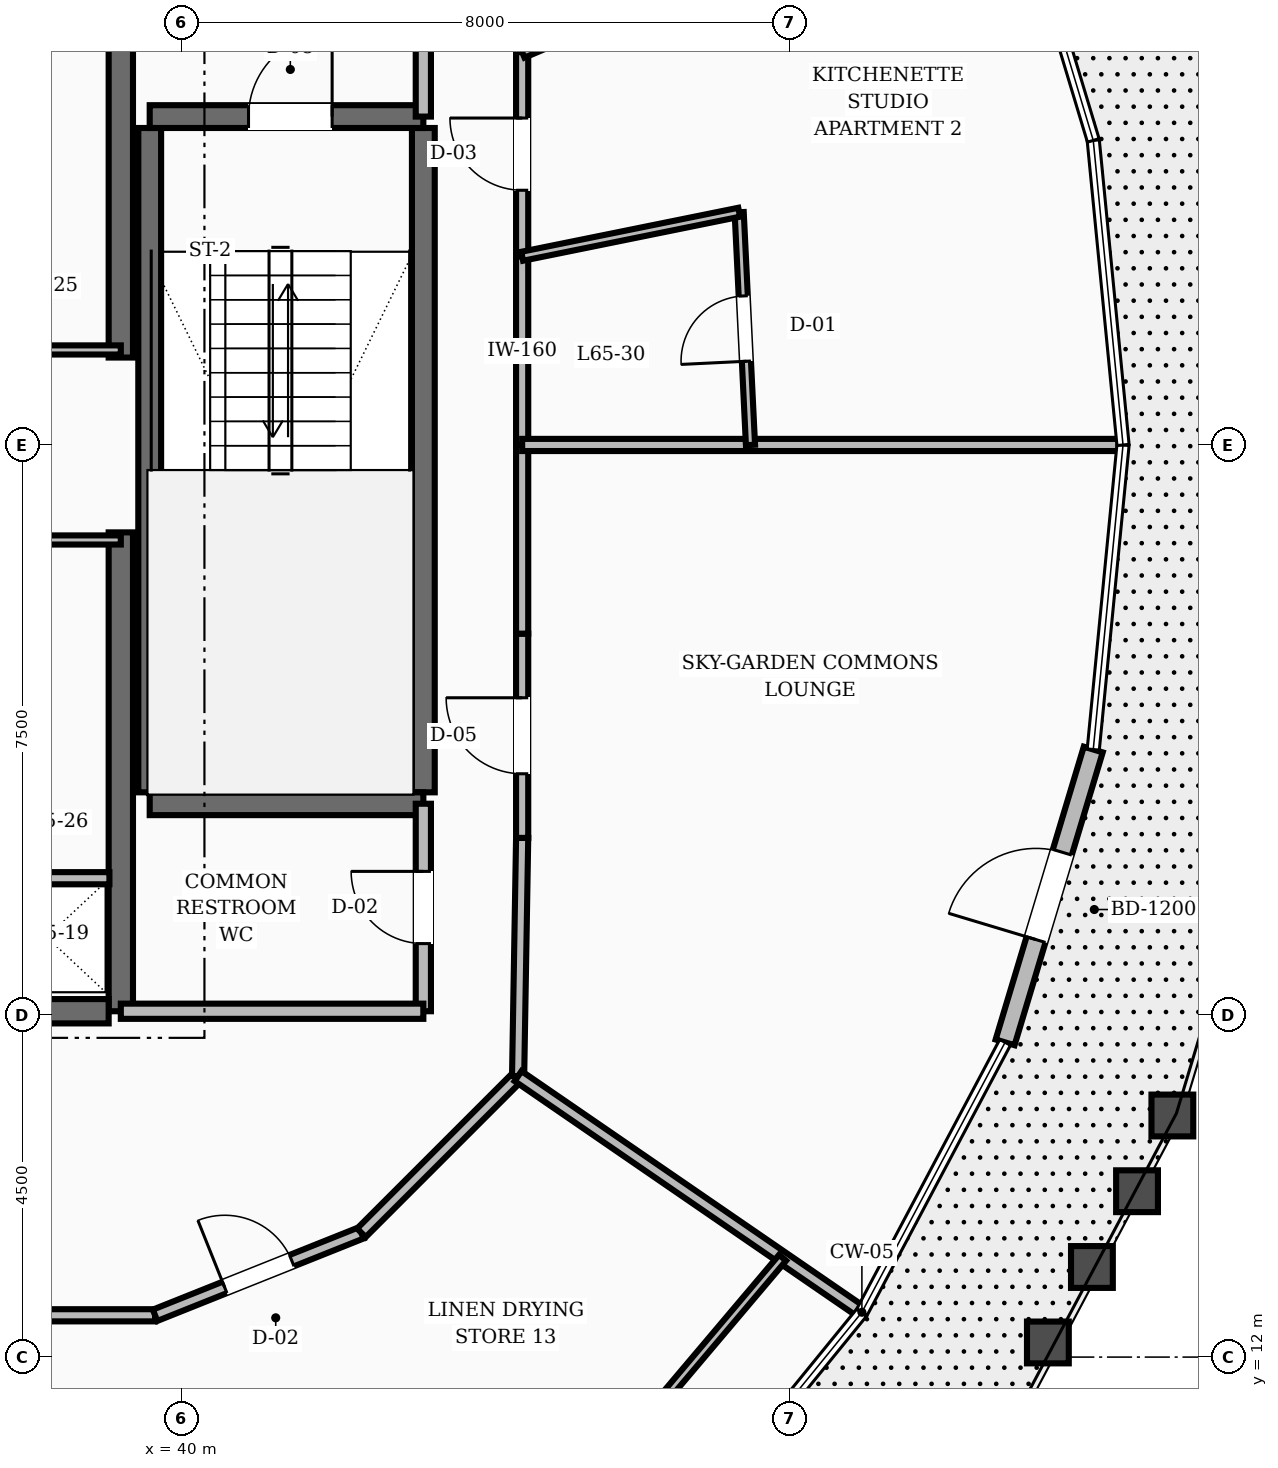
"""IFC4 building model, lengths in metres.
Left out: names, types, materials, properties, quantities, classifications, styles, units other than length and angle.
Written with IfcOpenShell. Run it as: python <this file> out.ifc"""

import sys

from ifc_helpers import new_model, si_unit, direction, frame, frame_2d, origin, place, context, subcontext, project, spatial, rectangle, extrude, element, fill, save


model = new_model("IFC4")
c1 = context("Model", 3, precision=1e-05, world=origin(), true_north=direction((0.0, 1.0)))
c2 = subcontext(c1, "Body", "Model", "MODEL_VIEW")
j1 = project(units=[si_unit("LENGTHUNIT", "METRE"), si_unit("PLANEANGLEUNIT", "RADIAN")], contexts=[c1])
p1 = place(None, origin())
s1 = spatial("IfcSite", under=j1, at=p1, CompositionType="ELEMENT")
p2 = place(p1, origin())
s2 = spatial("IfcBuilding", under=s1, at=p2, CompositionType="ELEMENT")
p3 = place(p2, frame((0.0, 0.0, 250.8)))
s3 = spatial("IfcBuildingStorey", under=s2, at=p3, CompositionType="ELEMENT", Elevation=250.8)
for number, where, z_axis, x_axis in (
    (1, (39.2, 16.55, 0.0), (0.0, 0.0, 1.0), (0.0, 1.0, 0.0)),
    (2, (39.2, 25.15, 0.0), (0.0, 0.0, 1.0), (0.0, 1.0, 0.0)),
):
    element("IfcWall", number, at=place(p3, frame(where, z_axis=z_axis, x_axis=x_axis)), inside=s3, PredefinedType="SHEAR", context=c2, shape_type="SweptSolid", body=[
        extrude(rectangle(XDim=6.3, YDim=0.32, at=frame_2d((3.15, 0.0))), origin(), (0.0, 0.0, 1.0), 3.6),
    ])
p4 = place(p3, frame((35.8, 16.55, 0.0), z_axis=(0.0, 0.0, 1.0), x_axis=(1.0, 0.0, 0.0)))
e3 = element("IfcWall", 3, at=p4, inside=s3, PredefinedType="SHEAR", context=c2, shape_type="SweptSolid", body=[
    extrude(rectangle(XDim=3.24, YDim=0.32, at=frame_2d((1.62, 0.0))), origin(), (0.0, 0.0, 1.0), 3.6),
])
p5 = place(p4, frame((0.3, 0.0, 0.0)))
e4 = element("IfcOpeningElement", 4, at=p5, cuts=e3, PredefinedType="OPENING", context=c2, shape_type="SweptSolid", body=[
    extrude(rectangle(XDim=1.1, YDim=2.1, at=frame_2d((0.55, 1.05))), frame((0.0, 0.17, 0.0), z_axis=(0.0, -1.0, 0.0), x_axis=(1.0, 0.0, 0.0)), (0.0, 0.0, 1.0), 0.34),
])
for number, where, z_axis, x_axis in (
    (5, (43.18, 19.43, 0.0), (0.0, 0.0, 1.0), (0.0, 1.0, 0.0)),
    (6, (39.58, 19.43, 0.0), (0.0, 0.0, 1.0), (0.0, 1.0, 0.0)),
):
    element("IfcWall", number, at=place(p3, frame(where, z_axis=z_axis, x_axis=x_axis)), inside=s3, PredefinedType="SHEAR", context=c2, shape_type="SweptSolid", body=[
        extrude(rectangle(XDim=8.74, YDim=0.3, at=frame_2d((4.37, 0.0))), origin(), (0.0, 0.0, 1.0), 3.6),
    ])
p6 = place(p3, frame((39.58, 19.28, 0.0), z_axis=(0.0, 0.0, 1.0), x_axis=(1.0, 0.0, 0.0)))
e7 = element("IfcWall", 7, at=p6, inside=s3, PredefinedType="SHEAR", context=c2, shape_type="SweptSolid", body=[
    extrude(rectangle(XDim=3.6, YDim=0.3, at=frame_2d((1.8, 0.0))), origin(), (0.0, 0.0, 1.0), 3.6),
])
p7 = place(p3, frame((39.58, 28.32, 0.0), z_axis=(0.0, 0.0, 1.0), x_axis=(1.0, 0.0, 0.0)))
e8 = element("IfcWall", 8, at=p7, inside=s3, PredefinedType="SHEAR", context=c2, shape_type="SweptSolid", body=[
    extrude(rectangle(XDim=3.6, YDim=0.3, at=frame_2d((1.8, 0.0))), origin(), (0.0, 0.0, 1.0), 3.6),
])
p8 = place(p7, frame((1.3, 0.0, 0.0)))
e9 = element("IfcOpeningElement", 9, at=p8, cuts=e8, PredefinedType="OPENING", context=c2, shape_type="SweptSolid", body=[
    extrude(rectangle(XDim=1.1, YDim=2.1, at=frame_2d((0.55, 1.05))), frame((0.0, 0.16, 0.0), z_axis=(0.0, -1.0, 0.0), x_axis=(1.0, 0.0, 0.0)), (0.0, 0.0, 1.0), 0.32),
])
p9 = place(p3, frame((50.833, 16.141, 0.0), z_axis=(0.0, 0.0, 1.0), x_axis=(0.288277391775, 0.957546941612, 0.0)))
e10 = element("IfcWall", 10, at=p9, inside=s3, PredefinedType="STANDARD", context=c2, shape_type="SweptSolid", body=[
    extrude(rectangle(XDim=4.024, YDim=0.26, at=frame_2d((2.012, 0.0))), origin(), (0.0, 0.0, 1.0), 2.88),
])
p10 = place(p9, frame((1.412, 0.0, 0.0)))
e11 = element("IfcOpeningElement", 11, at=p10, cuts=e10, PredefinedType="OPENING", context=c2, shape_type="SweptSolid", body=[
    extrude(rectangle(XDim=1.2, YDim=2.15, at=frame_2d((0.6, 1.075))), frame((0.0, 0.14, 0.0), z_axis=(0.0, -1.0, 0.0), x_axis=(1.0, 0.0, 0.0)), (0.0, 0.0, 1.0), 0.28),
])
p11 = place(p3, frame((43.18, 28.32, 0.0), z_axis=(0.0, 0.0, 1.0), x_axis=(0.0, 1.0, 0.0)))
e12 = element("IfcWall", 12, at=p11, inside=s3, PredefinedType="SOLIDWALL", context=c2, shape_type="SweptSolid", body=[
    extrude(rectangle(XDim=3.13, YDim=0.2, at=frame_2d((1.565, 0.0))), origin(), (0.0, 0.0, 1.0), 2.87),
])
p12 = place(p11, frame((1.015, 0.0, 0.0)))
e13 = element("IfcOpeningElement", 13, at=p12, cuts=e12, PredefinedType="OPENING", context=c2, shape_type="SweptSolid", body=[
    extrude(rectangle(XDim=1.1, YDim=2.1, at=frame_2d((0.55, 1.05))), frame((0.0, 0.11, 0.0), z_axis=(0.0, -1.0, 0.0), x_axis=(1.0, 0.0, 0.0)), (0.0, 0.0, 1.0), 0.22),
])
p13 = place(p3, frame((43.18, 16.55, 0.0), z_axis=(0.0, 0.0, 1.0), x_axis=(0.0, 1.0, 0.0)))
e14 = element("IfcWall", 14, at=p13, inside=s3, PredefinedType="SOLIDWALL", context=c2, shape_type="SweptSolid", body=[
    extrude(rectangle(XDim=2.73, YDim=0.2, at=frame_2d((1.365, 0.0))), origin(), (0.0, 0.0, 1.0), 2.87),
])
p14 = place(p13, frame((0.89, 0.0, 0.0)))
e15 = element("IfcOpeningElement", 15, at=p14, cuts=e14, PredefinedType="OPENING", context=c2, shape_type="SweptSolid", body=[
    extrude(rectangle(XDim=0.95, YDim=2.1, at=frame_2d((0.475, 1.05))), frame((0.0, 0.11, 0.0), z_axis=(0.0, -1.0, 0.0), x_axis=(1.0, 0.0, 0.0)), (0.0, 0.0, 1.0), 0.22),
])
p15 = place(p3, frame((39.2, 16.55, 0.0), z_axis=(0.0, 0.0, 1.0), x_axis=(1.0, 0.0, 0.0)))
e16 = element("IfcWall", 16, at=p15, inside=s3, PredefinedType="SOLIDWALL", context=c2, shape_type="SweptSolid", body=[
    extrude(rectangle(XDim=3.98, YDim=0.2, at=frame_2d((1.99, 0.0))), origin(), (0.0, 0.0, 1.0), 2.87),
])
p16 = place(p3, frame((37.4, 18.3, 0.0), z_axis=(0.0, 0.0, 1.0), x_axis=(1.0, 0.0, 0.0)))
e17 = element("IfcWall", 17, at=p16, inside=s3, PredefinedType="SOLIDWALL", context=c2, shape_type="SweptSolid", body=[
    extrude(rectangle(XDim=1.65, YDim=0.16, at=frame_2d((0.825, 0.0))), origin(), (0.0, 0.0, 1.0), 2.87),
])
for number, where, z_axis, x_axis in (
    (18, (37.4, 25.25, 0.0), (0.0, 0.0, 1.0), (1.0, 0.0, 0.0)),
    (19, (37.4, 22.75, 0.0), (0.0, 0.0, 1.0), (1.0, 0.0, 0.0)),
):
    element("IfcWall", number, at=place(p3, frame(where, z_axis=z_axis, x_axis=x_axis)), inside=s3, PredefinedType="PARTITIONING", context=c2, shape_type="SweptSolid", body=[
        extrude(rectangle(XDim=1.8, YDim=0.12, at=frame_2d((0.9, 0.0))), origin(), (0.0, 0.0, 1.0), 2.87),
    ])
p17 = place(p3, frame((44.48, 24.0, 0.0), z_axis=(0.0, 0.0, 1.0), x_axis=(0.0, 1.0, 0.0)))
e20 = element("IfcWall", 20, at=p17, inside=s3, PredefinedType="SOLIDWALL", context=c2, shape_type="SweptSolid", body=[
    extrude(rectangle(XDim=2.482, YDim=0.16, at=frame_2d((1.241, 0.0))), origin(), (0.0, 0.0, 1.0), 2.87),
])
p18 = place(p3, frame((44.48, 26.482, 0.0), z_axis=(0.0, 0.0, 1.0), x_axis=(0.0, 1.0, 0.0)))
e21 = element("IfcWall", 21, at=p18, inside=s3, PredefinedType="SOLIDWALL", context=c2, shape_type="SweptSolid", body=[
    extrude(rectangle(XDim=2.687, YDim=0.16, at=frame_2d((1.344, 0.0))), origin(), (0.0, 0.0, 1.0), 2.87),
])
p19 = place(p18, frame((0.868, 0.0, 0.0)))
e22 = element("IfcOpeningElement", 22, at=p19, cuts=e21, PredefinedType="OPENING", context=c2, shape_type="SweptSolid", body=[
    extrude(rectangle(XDim=0.95, YDim=2.1, at=frame_2d((0.475, 1.05))), frame((0.0, 0.09, 0.0), z_axis=(0.0, -1.0, 0.0), x_axis=(1.0, 0.0, 0.0)), (0.0, 0.0, 1.0), 0.18),
])
p20 = place(p3, frame((44.48, 29.169, 0.0), z_axis=(0.0, 0.0, 1.0), x_axis=(-0.016981035134, 0.999855811828, 0.0)))
e23 = element("IfcWall", 23, at=p20, inside=s3, PredefinedType="SOLIDWALL", context=c2, shape_type="SweptSolid", body=[
    extrude(rectangle(XDim=3.134, YDim=0.16, at=frame_2d((1.567, 0.0))), origin(), (0.0, 0.0, 1.0), 2.87),
])
p21 = place(p3, frame((36.743, 12.55, 0.0), z_axis=(0.0, 0.0, 1.0), x_axis=(1.0, 0.0, 0.0)))
e24 = element("IfcWall", 24, at=p21, inside=s3, PredefinedType="SOLIDWALL", context=c2, shape_type="SweptSolid", body=[
    extrude(rectangle(XDim=2.908, YDim=0.16, at=frame_2d((1.454, 0.0))), origin(), (0.0, 0.0, 1.0), 2.87),
])
p22 = place(p3, frame((39.651, 12.55, 0.0), z_axis=(0.0, 0.0, 1.0), x_axis=(0.92856882165, 0.371160266542, 0.0)))
e25 = element("IfcWall", 25, at=p22, inside=s3, PredefinedType="SOLIDWALL", context=c2, shape_type="SweptSolid", body=[
    extrude(rectangle(XDim=2.923, YDim=0.16, at=frame_2d((1.461, 0.0))), origin(), (0.0, 0.0, 1.0), 2.87),
])
p23 = place(p22, frame((0.987, 0.0, 0.0)))
e26 = element("IfcOpeningElement", 26, at=p23, cuts=e25, PredefinedType="OPENING", context=c2, shape_type="SweptSolid", body=[
    extrude(rectangle(XDim=0.95, YDim=2.1, at=frame_2d((0.475, 1.05))), frame((0.0, 0.09, 0.0), z_axis=(0.0, -1.0, 0.0), x_axis=(1.0, 0.0, 0.0)), (0.0, 0.0, 1.0), 0.18),
])
p24 = place(p3, frame((42.365, 13.635, 0.0), z_axis=(0.0, 0.0, 1.0), x_axis=(0.707106781187, 0.707106781187, 0.0)))
e27 = element("IfcWall", 27, at=p24, inside=s3, PredefinedType="SOLIDWALL", context=c2, shape_type="SweptSolid", body=[
    extrude(rectangle(XDim=2.916, YDim=0.16, at=frame_2d((1.458, 0.0))), origin(), (0.0, 0.0, 1.0), 2.87),
])
p25 = place(p3, frame((44.427, 15.697, 0.0), z_axis=(0.0, 0.0, 1.0), x_axis=(0.016981035134, 0.999855811828, 0.0)))
e28 = element("IfcWall", 28, at=p25, inside=s3, PredefinedType="SOLIDWALL", context=c2, shape_type="SweptSolid", body=[
    extrude(rectangle(XDim=3.134, YDim=0.16, at=frame_2d((1.567, 0.0))), origin(), (0.0, 0.0, 1.0), 2.87),
])
p26 = place(p3, frame((44.48, 18.831, 0.0), z_axis=(0.0, 0.0, 1.0), x_axis=(0.0, 1.0, 0.0)))
e29 = element("IfcWall", 29, at=p26, inside=s3, PredefinedType="SOLIDWALL", context=c2, shape_type="SweptSolid", body=[
    extrude(rectangle(XDim=2.687, YDim=0.16, at=frame_2d((1.344, 0.0))), origin(), (0.0, 0.0, 1.0), 2.87),
])
p27 = place(p26, frame((0.844, 0.0, 0.0)))
e30 = element("IfcOpeningElement", 30, at=p27, cuts=e29, PredefinedType="OPENING", context=c2, shape_type="SweptSolid", body=[
    extrude(rectangle(XDim=1.0, YDim=2.1, at=frame_2d((0.5, 1.05))), frame((0.0, 0.09, 0.0), z_axis=(0.0, -1.0, 0.0), x_axis=(1.0, 0.0, 0.0)), (0.0, 0.0, 1.0), 0.18),
])
p28 = place(p3, frame((44.48, 21.518, 0.0), z_axis=(0.0, 0.0, 1.0), x_axis=(0.0, 1.0, 0.0)))
e31 = element("IfcWall", 31, at=p28, inside=s3, PredefinedType="SOLIDWALL", context=c2, shape_type="SweptSolid", body=[
    extrude(rectangle(XDim=2.482, YDim=0.16, at=frame_2d((1.241, 0.0))), origin(), (0.0, 0.0, 1.0), 2.87),
])
p29 = place(p3, frame((44.427, 15.697, 0.0), z_axis=(0.0, 0.0, 1.0), x_axis=(0.824260654359, -0.566210538294, 0.0)))
e32 = element("IfcWall", 32, at=p29, inside=s3, PredefinedType="SOLIDWALL", context=c2, shape_type="SweptSolid", body=[
    extrude(rectangle(XDim=5.437, YDim=0.16, at=frame_2d((2.719, 0.0))), origin(), (0.0, 0.0, 1.0), 2.87),
])
p30 = place(p3, frame((44.48, 24.0, 0.0), z_axis=(0.0, 0.0, 1.0), x_axis=(1.0, 0.0, 0.0)))
e33 = element("IfcWall", 33, at=p30, inside=s3, PredefinedType="SOLIDWALL", context=c2, shape_type="SweptSolid", body=[
    extrude(rectangle(XDim=7.855, YDim=0.16, at=frame_2d((3.928, 0.0))), origin(), (0.0, 0.0, 1.0), 2.87),
])
p31 = place(p3, frame((47.484, 24.0, 0.0), z_axis=(0.0, 0.0, 1.0), x_axis=(-0.048507424132, 0.998822822028, 0.0)))
e34 = element("IfcWall", 34, at=p31, inside=s3, PredefinedType="PARTITIONING", context=c2, shape_type="SweptSolid", body=[
    extrude(rectangle(XDim=3.065, YDim=0.12, at=frame_2d((1.533, 0.0))), origin(), (0.0, 0.0, 1.0), 2.87),
])
p32 = place(p31, frame((1.103, 0.0, 0.0)))
e35 = element("IfcOpeningElement", 35, at=p32, cuts=e34, PredefinedType="OPENING", context=c2, shape_type="SweptSolid", body=[
    extrude(rectangle(XDim=0.86, YDim=2.1, at=frame_2d((0.43, 1.05))), frame((0.0, 0.07, 0.0), z_axis=(0.0, -1.0, 0.0), x_axis=(1.0, 0.0, 0.0)), (0.0, 0.0, 1.0), 0.14),
])
p33 = place(p3, frame((44.48, 26.482, 0.0), z_axis=(0.0, 0.0, 1.0), x_axis=(0.980045260394, 0.198774464101, 0.0)))
e36 = element("IfcWall", 36, at=p33, inside=s3, PredefinedType="PARTITIONING", context=c2, shape_type="SweptSolid", body=[
    extrude(rectangle(XDim=2.913, YDim=0.12, at=frame_2d((1.457, 0.0))), origin(), (0.0, 0.0, 1.0), 2.87),
])
p34 = place(p3, frame((44.48, 29.169, 0.0), z_axis=(0.0, 0.0, 1.0), x_axis=(0.920872772273, 0.389863228949, 0.0)))
e37 = element("IfcWall", 37, at=p34, inside=s3, PredefinedType="SOLIDWALL", context=c2, shape_type="SweptSolid", body=[
    extrude(rectangle(XDim=6.85, YDim=0.16, at=frame_2d((3.425, 0.0))), origin(), (0.0, 0.0, 1.0), 2.87),
])
p35 = place(p3, frame((36.743, 12.55, 0.0), z_axis=(0.0, 0.0, 1.0), x_axis=(0.376547405106, -0.926397350875, 0.0)))
e38 = element("IfcWall", 38, at=p35, inside=s3, PredefinedType="SOLIDWALL", context=c2, shape_type="SweptSolid", body=[
    extrude(rectangle(XDim=8.072, YDim=0.16, at=frame_2d((4.036, 0.0))), origin(), (0.0, 0.0, 1.0), 2.87),
])
p36 = place(p3, frame((45.48, 10.437, 0.0), z_axis=(0.0, 0.0, 1.0), x_axis=(0.645581040063, 0.76369177075, 0.0)))
e39 = element("IfcWall", 39, at=p36, inside=s3, PredefinedType="PARTITIONING", context=c2, shape_type="SweptSolid", body=[
    extrude(rectangle(XDim=3.758, YDim=0.12, at=frame_2d((1.879, 0.0))), origin(), (0.0, 0.0, 1.0), 2.87),
])
p37 = place(p10, origin())
e40 = element("IfcDoor", 40, at=p37, inside=s3, OperationType="SINGLE_SWING_LEFT", PredefinedType="DOOR", context=c2, shape_type="SweptSolid", body=[
    extrude(rectangle(XDim=1.2, YDim=2.15, at=frame_2d((0.6, 1.075))), frame((0.0, 0.025, 0.0), z_axis=(0.0, -1.0, 0.0), x_axis=(1.0, 0.0, 0.0)), (0.0, 0.0, 1.0), 0.05),
])
fill(e11, e40)
p38 = place(p8, origin())
e41 = element("IfcDoor", 41, at=p38, inside=s3, OperationType="SINGLE_SWING_RIGHT", PredefinedType="DOOR", context=c2, shape_type="SweptSolid", body=[
    extrude(rectangle(XDim=1.1, YDim=2.1, at=frame_2d((0.55, 1.05))), frame((0.0, 0.025, 0.0), z_axis=(0.0, -1.0, 0.0), x_axis=(1.0, 0.0, 0.0)), (0.0, 0.0, 1.0), 0.05),
])
fill(e9, e41)
p39 = place(p14, origin())
e42 = element("IfcDoor", 42, at=p39, inside=s3, OperationType="SINGLE_SWING_RIGHT", PredefinedType="DOOR", context=c2, shape_type="SweptSolid", body=[
    extrude(rectangle(XDim=0.95, YDim=2.1, at=frame_2d((0.475, 1.05))), frame((0.0, 0.025, 0.0), z_axis=(0.0, -1.0, 0.0), x_axis=(1.0, 0.0, 0.0)), (0.0, 0.0, 1.0), 0.05),
])
fill(e15, e42)
p40 = place(p27, origin())
e43 = element("IfcDoor", 43, at=p40, inside=s3, OperationType="SINGLE_SWING_RIGHT", PredefinedType="DOOR", context=c2, shape_type="SweptSolid", body=[
    extrude(rectangle(XDim=1.0, YDim=2.1, at=frame_2d((0.5, 1.05))), frame((0.0, 0.025, 0.0), z_axis=(0.0, -1.0, 0.0), x_axis=(1.0, 0.0, 0.0)), (0.0, 0.0, 1.0), 0.05),
])
fill(e30, e43)
p41 = place(p32, origin())
e44 = element("IfcDoor", 44, at=p41, inside=s3, OperationType="SINGLE_SWING_LEFT", PredefinedType="DOOR", context=c2, shape_type="SweptSolid", body=[
    extrude(rectangle(XDim=0.86, YDim=2.1, at=frame_2d((0.43, 1.05))), frame((0.0, 0.025, 0.0), z_axis=(0.0, -1.0, 0.0), x_axis=(1.0, 0.0, 0.0)), (0.0, 0.0, 1.0), 0.05),
])
fill(e35, e44)
p42 = place(p19, origin())
e45 = element("IfcDoor", 45, at=p42, inside=s3, OperationType="SINGLE_SWING_RIGHT", PredefinedType="DOOR", context=c2, shape_type="SweptSolid", body=[
    extrude(rectangle(XDim=0.95, YDim=2.1, at=frame_2d((0.475, 1.05))), frame((0.0, 0.025, 0.0), z_axis=(0.0, -1.0, 0.0), x_axis=(1.0, 0.0, 0.0)), (0.0, 0.0, 1.0), 0.05),
])
fill(e22, e45)
p43 = place(p23, origin())
e46 = element("IfcDoor", 46, at=p43, inside=s3, OperationType="SINGLE_SWING_LEFT", PredefinedType="DOOR", context=c2, shape_type="SweptSolid", body=[
    extrude(rectangle(XDim=0.95, YDim=2.1, at=frame_2d((0.475, 1.05))), frame((0.0, 0.025, 0.0), z_axis=(0.0, -1.0, 0.0), x_axis=(1.0, 0.0, 0.0)), (0.0, 0.0, 1.0), 0.05),
])
fill(e26, e46)
save(model, sys.argv[1])
